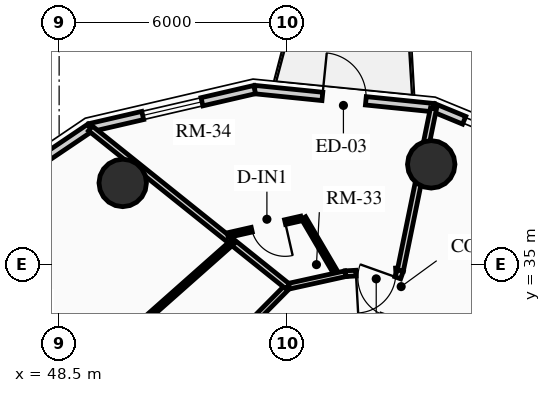
"""IFC4 building model, lengths in metres.
Left out: names, types, materials, properties, quantities, classifications, styles, units other than length and angle.
Written with IfcOpenShell. Run it as: python <this file> out.ifc"""

import sys

from ifc_helpers import new_model, si_unit, direction, frame, frame_2d, origin, origin_2d, place, context, subcontext, project, spatial, rectangle, circle, extrude, source, transform, mapped, element, fill, save


model = new_model("IFC4")
c1 = context("Model", 3, precision=1e-05, world=origin(), true_north=direction((0.0, 1.0)))
c2 = subcontext(c1, "Body", "Model", "MODEL_VIEW")
j1 = project(units=[si_unit("LENGTHUNIT", "METRE"), si_unit("PLANEANGLEUNIT", "RADIAN")], contexts=[c1])
p1 = place(None, origin())
s1 = spatial("IfcSite", under=j1, at=p1, CompositionType="ELEMENT")
p2 = place(p1, origin())
s2 = spatial("IfcBuilding", under=s1, at=p2, CompositionType="ELEMENT")
p3 = place(p2, frame((0.0, 0.0, 169.06)))
s3 = spatial("IfcBuildingStorey", under=s2, at=p3, CompositionType="ELEMENT", Elevation=169.06)
for number, where, z_axis, x_axis in (
    (1, (58.291, 37.635, 0.0), (0.0, 0.0, 1.0), (1.0, 0.0, 0.0)),
    (2, (50.173, 37.146, 0.0), (0.0, 0.0, 1.0), (1.0, 0.0, 0.0)),
):
    element("IfcColumn", number, at=place(p3, frame(where, z_axis=z_axis, x_axis=x_axis)), inside=s3, PredefinedType="USERDEFINED", context=c2, shape_type="SweptSolid", body=[
        extrude(circle(Radius=0.625, at=origin_2d()), origin(), (0.0, 0.0, 1.0), 2.91),
    ])
p4 = place(p3, frame((58.354, 39.127, 0.0), z_axis=(0.0, 0.0, 1.0), x_axis=(0.924556017656, -0.381046152345, 0.0)))
e3 = element("IfcWall", 3, at=p4, inside=s3, PredefinedType="SOLIDWALL", context=c2, shape_type="SweptSolid", body=[
    extrude(rectangle(XDim=0.87, YDim=0.22, at=frame_2d((0.435, 0.0))), origin(), (0.0, 0.0, 1.0), 2.245),
])
p5 = place(p3, frame((53.645, 39.603, 0.0), z_axis=(0.0, 0.0, 1.0), x_axis=(0.994943283129, -0.100438356004, 0.0)))
e4 = element("IfcWall", 4, at=p5, inside=s3, PredefinedType="SOLIDWALL", context=c2, shape_type="SweptSolid", body=[
    extrude(rectangle(XDim=4.733, YDim=0.22, at=frame_2d((2.366, 0.0))), origin(), (0.0, 0.0, 1.0), 2.245),
])
m1 = source(origin(), c2, "Body", "SweptSolid", [
    extrude(rectangle(XDim=1.15, YDim=2.005, at=frame_2d((0.575, 1.002))), frame((0.0, 0.12, 0.0), z_axis=(0.0, -1.0, 0.0), x_axis=(1.0, 0.0, 0.0)), (0.0, 0.0, 1.0), 0.24),
])
p6 = place(p5, frame((1.791, 0.0, 0.0)))
e5 = element("IfcOpeningElement", 5, at=p6, cuts=e4, PredefinedType="OPENING", context=c2, shape_type="MappedRepresentation", body=[
    mapped(m1, transform((0.0, 0.0, 0.0), x_axis=(1.0, 0.0, 0.0), y_axis=(0.0, 1.0, 0.0), z_axis=(0.0, 0.0, 1.0), scale=1.0)),
])
p7 = place(p3, frame((49.313, 38.6, 0.0), z_axis=(0.0, 0.0, 1.0), x_axis=(0.97422620202, 0.22557328587, 0.0)))
e6 = element("IfcWall", 6, at=p7, inside=s3, PredefinedType="SOLIDWALL", context=c2, shape_type="SweptSolid", body=[
    extrude(rectangle(XDim=4.446, YDim=0.22, at=frame_2d((2.223, 0.0))), origin(), (0.0, 0.0, 1.0), 2.245),
])
m2 = source(origin(), c2, "Body", "SweptSolid", [
    extrude(rectangle(XDim=1.6, YDim=1.3, at=frame_2d((0.8, 0.65))), frame((0.0, 0.12, 0.0), z_axis=(0.0, -1.0, 0.0), x_axis=(1.0, 0.0, 0.0)), (0.0, 0.0, 1.0), 0.24),
])
p8 = place(p7, frame((1.423, 0.0, 0.65)))
e7 = element("IfcOpeningElement", 7, at=p8, cuts=e6, PredefinedType="OPENING", context=c2, shape_type="MappedRepresentation", body=[
    mapped(m2, transform((0.0, 0.0, 0.0), x_axis=(1.0, 0.0, 0.0), y_axis=(0.0, 1.0, 0.0), z_axis=(0.0, 0.0, 1.0), scale=1.0)),
])
p9 = place(p3, frame((45.783, 36.217, 0.0), z_axis=(0.0, 0.0, 1.0), x_axis=(0.828817439852, 0.55951912514, 0.0)))
e8 = element("IfcWall", 8, at=p9, inside=s3, PredefinedType="SOLIDWALL", context=c2, shape_type="SweptSolid", body=[
    extrude(rectangle(XDim=4.259, YDim=0.22, at=frame_2d((2.129, 0.0))), origin(), (0.0, 0.0, 1.0), 2.245),
])
p10 = place(p3, frame((57.478, 34.838, 0.0), z_axis=(0.0, 0.0, 1.0), x_axis=(-0.998448388303, -0.05568497011, 0.0)))
e9 = element("IfcWall", 9, at=p10, inside=s3, PredefinedType="PARTITIONING", context=c2, shape_type="SweptSolid", body=[
    extrude(rectangle(XDim=1.447, YDim=0.15, at=frame_2d((0.723, 0.0))), origin(), (0.0, 0.0, 1.0), 2.245),
])
m3 = source(origin(), c2, "Body", "SweptSolid", [
    extrude(rectangle(XDim=1.05, YDim=2.015, at=frame_2d((0.525, 1.007))), frame((0.0, 0.085, 0.0), z_axis=(0.0, -1.0, 0.0), x_axis=(1.0, 0.0, 0.0)), (0.0, 0.0, 1.0), 0.17),
])
p11 = place(p10, frame((0.12, 0.0, 0.0)))
e10 = element("IfcOpeningElement", 10, at=p11, cuts=e9, PredefinedType="OPENING", context=c2, shape_type="MappedRepresentation", body=[
    mapped(m3, transform((0.0, 0.0, 0.0), x_axis=(1.0, 0.0, 0.0), y_axis=(0.0, 1.0, 0.0), z_axis=(0.0, 0.0, 1.0), scale=1.0)),
])
p12 = place(p3, frame((56.033, 34.757, 0.0), z_axis=(0.0, 0.0, 1.0), x_axis=(-0.976507263775, -0.215484486204, 0.0)))
e11 = element("IfcWall", 11, at=p12, inside=s3, PredefinedType="PARTITIONING", context=c2, shape_type="SweptSolid", body=[
    extrude(rectangle(XDim=1.556, YDim=0.15, at=frame_2d((0.778, 0.0))), origin(), (0.0, 0.0, 1.0), 2.245),
])
p13 = place(p3, frame((54.514, 34.422, 0.0), z_axis=(0.0, 0.0, 1.0), x_axis=(-0.703289573518, -0.710903492593, 0.0)))
e12 = element("IfcWall", 12, at=p13, inside=s3, PredefinedType="PARTITIONING", context=c2, shape_type="SweptSolid", body=[
    extrude(rectangle(XDim=3.303, YDim=0.15, at=frame_2d((1.651, 0.0))), origin(), (0.0, 0.0, 1.0), 2.245),
])
p14 = place(p3, frame((57.478, 34.838, 0.0), z_axis=(0.0, 0.0, 1.0), x_axis=(0.200272806445, 0.979740171167, 0.0)))
e13 = element("IfcWall", 13, at=p14, inside=s3, PredefinedType="PARTITIONING", context=c2, shape_type="SweptSolid", body=[
    extrude(rectangle(XDim=4.358, YDim=0.16, at=frame_2d((2.179, 0.0))), origin(), (0.0, 0.0, 1.0), 2.245),
])
p15 = place(p3, frame((54.514, 34.422, 0.0), z_axis=(0.0, 0.0, 1.0), x_axis=(-0.780385234796, 0.625299036712, 0.0)))
e14 = element("IfcWall", 14, at=p15, inside=s3, PredefinedType="PARTITIONING", context=c2, shape_type="SweptSolid", body=[
    extrude(rectangle(XDim=6.653, YDim=0.16, at=frame_2d((3.326, 0.0))), origin(), (0.0, 0.0, 1.0), 2.245),
])
p16 = place(p3, frame((56.828, 33.021, 0.0), z_axis=(0.0, 0.0, 1.0), x_axis=(0.336608838259, 0.941644566705, 0.0)))
e15 = element("IfcWall", 15, at=p16, inside=s3, PredefinedType="PARTITIONING", context=c2, shape_type="SweptSolid", body=[
    extrude(rectangle(XDim=1.93, YDim=0.16, at=frame_2d((0.965, 0.0))), origin(), (0.0, 0.0, 1.0), 2.245),
])
m4 = source(origin(), c2, "Body", "SweptSolid", [
    extrude(rectangle(XDim=1.05, YDim=2.015, at=frame_2d((0.525, 1.007))), frame((0.0, 0.09, 0.0), z_axis=(0.0, -1.0, 0.0), x_axis=(1.0, 0.0, 0.0)), (0.0, 0.0, 1.0), 0.18),
])
p17 = place(p16, frame((0.68, 0.0, 0.0)))
e16 = element("IfcOpeningElement", 16, at=p17, cuts=e15, PredefinedType="OPENING", context=c2, shape_type="MappedRepresentation", body=[
    mapped(m4, transform((0.0, 0.0, 0.0), x_axis=(1.0, 0.0, 0.0), y_axis=(0.0, 1.0, 0.0), z_axis=(0.0, 0.0, 1.0), scale=1.0)),
])
p18 = place(p3, frame((55.737, 34.853, 0.0), z_axis=(0.0, 0.0, 1.0), x_axis=(-0.506282425857, 0.862367732043, 0.0)))
e17 = element("IfcWall", 17, at=p18, inside=s3, PredefinedType="PARTITIONING", context=c2, shape_type="SweptSolid", body=[
    extrude(rectangle(XDim=1.591, YDim=0.125, at=frame_2d((0.796, 0.0))), origin(), (0.0, 0.0, 1.0), 2.245),
])
p19 = place(p3, frame((54.871, 36.211, 0.0), z_axis=(0.0, 0.0, 1.0), x_axis=(-0.975212623293, -0.221269833846, 0.0)))
e18 = element("IfcWall", 18, at=p19, inside=s3, PredefinedType="PARTITIONING", context=c2, shape_type="SweptSolid", body=[
    extrude(rectangle(XDim=1.983, YDim=0.125, at=frame_2d((0.991, 0.0))), origin(), (0.0, 0.0, 1.0), 2.312),
])
m5 = source(origin(), c2, "Body", "SweptSolid", [
    extrude(rectangle(XDim=0.9, YDim=2.005, at=frame_2d((0.45, 1.002))), frame((0.0, 0.073, 0.0), z_axis=(0.0, -1.0, 0.0), x_axis=(1.0, 0.0, 0.0)), (0.0, 0.0, 1.0), 0.145),
])
p20 = place(p19, frame((0.436, 0.0, 0.0)))
e19 = element("IfcOpeningElement", 19, at=p20, cuts=e18, PredefinedType="OPENING", context=c2, shape_type="MappedRepresentation", body=[
    mapped(m5, transform((0.0, 0.0, 0.0), x_axis=(1.0, 0.0, 0.0), y_axis=(0.0, 1.0, 0.0), z_axis=(0.0, 0.0, 1.0), scale=1.0)),
])
p21 = place(p3, frame((53.06, 35.587, 0.0), z_axis=(0.0, 0.0, 1.0), x_axis=(-0.748390346028, -0.663258539314, 0.0)))
e20 = element("IfcWall", 20, at=p21, inside=s3, PredefinedType="PARTITIONING", context=c2, shape_type="SweptSolid", body=[
    extrude(rectangle(XDim=3.553, YDim=0.125, at=frame_2d((1.777, 0.0))), origin(), (0.0, 0.0, 1.0), 2.245),
])
m6 = source(origin(), c2, "Body", "SweptSolid", [
    extrude(rectangle(XDim=1.15, YDim=2.005, at=frame_2d((0.575, 1.002))), frame((0.0, 0.025, 0.0), z_axis=(0.0, -1.0, 0.0), x_axis=(1.0, 0.0, 0.0)), (0.0, 0.0, 1.0), 0.05),
])
p22 = place(p6, origin())
e21 = element("IfcDoor", 21, at=p22, inside=s3, OperationType="SINGLE_SWING_LEFT", PredefinedType="DOOR", context=c2, shape_type="MappedRepresentation", body=[
    mapped(m6, transform((0.0, 0.0, 0.0), x_axis=(1.0, 0.0, 0.0), y_axis=(0.0, 1.0, 0.0), z_axis=(0.0, 0.0, 1.0), scale=1.0)),
])
fill(e5, e21)
m7 = source(origin(), c2, "Body", "SweptSolid", [
    extrude(rectangle(XDim=1.6, YDim=1.3, at=frame_2d((0.8, 0.65))), frame((0.0, 0.03, 0.0), z_axis=(0.0, -1.0, 0.0), x_axis=(1.0, 0.0, 0.0)), (0.0, 0.0, 1.0), 0.06),
])
p23 = place(p8, origin())
e22 = element("IfcWindow", 22, at=p23, inside=s3, PartitioningType="SINGLE_PANEL", PredefinedType="WINDOW", context=c2, shape_type="MappedRepresentation", body=[
    mapped(m7, transform((0.0, 0.0, 0.0), x_axis=(1.0, 0.0, 0.0), y_axis=(0.0, 1.0, 0.0), z_axis=(0.0, 0.0, 1.0), scale=1.0)),
])
fill(e7, e22)
m8 = source(origin(), c2, "Body", "SweptSolid", [
    extrude(rectangle(XDim=1.05, YDim=2.015, at=frame_2d((0.525, 1.007))), frame((0.0, 0.025, 0.0), z_axis=(0.0, -1.0, 0.0), x_axis=(1.0, 0.0, 0.0)), (0.0, 0.0, 1.0), 0.05),
])
p24 = place(p17, origin())
e23 = element("IfcDoor", 23, at=p24, inside=s3, OperationType="SINGLE_SWING_RIGHT", PredefinedType="DOOR", context=c2, shape_type="MappedRepresentation", body=[
    mapped(m8, transform((0.0, 0.0, 0.0), x_axis=(1.0, 0.0, 0.0), y_axis=(0.0, 1.0, 0.0), z_axis=(0.0, 0.0, 1.0), scale=1.0)),
])
fill(e16, e23)
p25 = place(p11, origin())
e24 = element("IfcDoor", 24, at=p25, inside=s3, OperationType="SINGLE_SWING_RIGHT", PredefinedType="DOOR", context=c2, shape_type="MappedRepresentation", body=[
    mapped(m8, transform((0.0, 0.0, 0.0), x_axis=(1.0, 0.0, 0.0), y_axis=(0.0, 1.0, 0.0), z_axis=(0.0, 0.0, 1.0), scale=1.0)),
])
fill(e10, e24)
m9 = source(origin(), c2, "Body", "SweptSolid", [
    extrude(rectangle(XDim=0.9, YDim=2.005, at=frame_2d((0.45, 1.002))), frame((0.0, 0.025, 0.0), z_axis=(0.0, -1.0, 0.0), x_axis=(1.0, 0.0, 0.0)), (0.0, 0.0, 1.0), 0.05),
])
p26 = place(p20, origin())
e25 = element("IfcDoor", 25, at=p26, inside=s3, OperationType="SINGLE_SWING_LEFT", PredefinedType="DOOR", context=c2, shape_type="MappedRepresentation", body=[
    mapped(m9, transform((0.0, 0.0, 0.0), x_axis=(1.0, 0.0, 0.0), y_axis=(0.0, 1.0, 0.0), z_axis=(0.0, 0.0, 1.0), scale=1.0)),
])
fill(e19, e25)
save(model, sys.argv[1])
